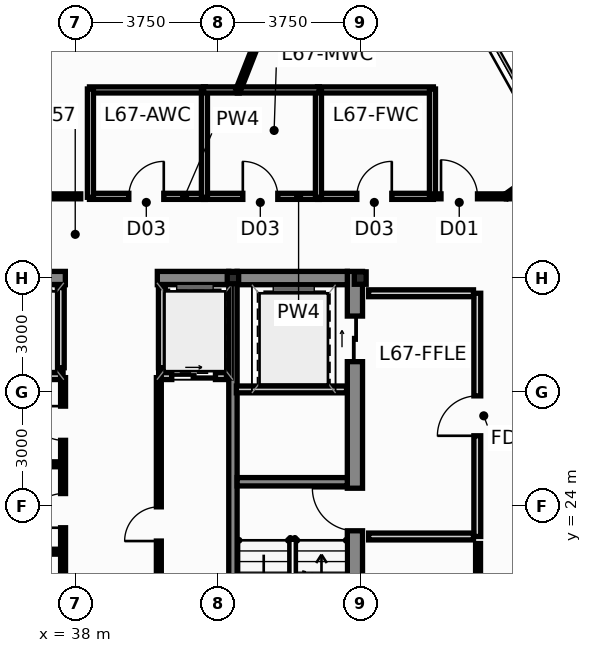
"""IFC4 building model, lengths in metres.
Left out: names, types, materials, properties, quantities, classifications, styles, units other than length and angle.
Written with IfcOpenShell. Run it as: python <this file> out.ifc"""

import sys

from ifc_helpers import new_model, si_unit, direction, frame, frame_2d, origin, origin_2d, place, context, subcontext, project, spatial, rectangle, hollow_rectangle, i_section, extrude, source, transform, mapped, element, fill, save


model = new_model("IFC4")
c1 = context("Model", 3, precision=1e-05, world=origin(), true_north=direction((0.0, 1.0)))
c2 = subcontext(c1, "Body", "Model", "MODEL_VIEW")
j1 = project(units=[si_unit("LENGTHUNIT", "METRE"), si_unit("PLANEANGLEUNIT", "RADIAN")], contexts=[c1])
p1 = place(None, origin())
s1 = spatial("IfcSite", under=j1, at=p1, CompositionType="ELEMENT")
p2 = place(p1, origin())
s2 = spatial("IfcBuilding", under=s1, at=p2, CompositionType="ELEMENT")
p3 = place(p2, frame((0.0, 0.0, 255.4)))
s3 = spatial("IfcBuildingStorey", under=s2, at=p3, CompositionType="ELEMENT", Elevation=255.4)
m1 = source(origin(), c2, "Body", "SweptSolid", [
    extrude(i_section(OverallWidth=0.311, OverallDepth=0.327, WebThickness=0.016, FlangeThickness=0.025, at=origin_2d()), origin(), (0.0, 0.0, 1.0), 3.65),
])
p4 = place(p3, frame((45.5, 30.0, 0.0), z_axis=(0.0, 0.0, 1.0), x_axis=(1.0, 0.0, 0.0)))
e1 = element("IfcColumn", 1, at=p4, inside=s3, PredefinedType="COLUMN", context=c2, shape_type="MappedRepresentation", body=[
    mapped(m1, transform((0.0, 0.0, 0.0), scale=1.0)),
])
m2 = source(origin(), c2, "Body", "SweptSolid", [
    extrude(hollow_rectangle(XDim=0.3, YDim=0.3, WallThickness=0.012, at=origin_2d()), origin(), (0.0, 0.0, 1.0), 3.65),
])
p5 = place(p3, frame((42.15, 30.0, 0.0), z_axis=(0.0, 0.0, 1.0), x_axis=(1.0, 0.0, 0.0)))
e2 = element("IfcColumn", 2, at=p5, inside=s3, PredefinedType="COLUMN", context=c2, shape_type="MappedRepresentation", body=[
    mapped(m2, transform((0.0, 0.0, 0.0), scale=1.0)),
])
p6 = place(p3, frame((45.36, 17.05, 0.0), z_axis=(0.0, 0.0, 1.0), x_axis=(0.0, 1.0, 0.0)))
e3 = element("IfcWall", 3, at=p6, inside=s3, PredefinedType="SHEAR", context=c2, shape_type="SweptSolid", body=[
    extrude(rectangle(XDim=13.125, YDim=0.4, at=frame_2d((6.562, 0.0))), origin(), (0.0, 0.0, 1.0), 3.65),
])
p7 = place(p6, frame((6.3, 0.0, 0.0)))
e4 = element("IfcOpeningElement", 4, at=p7, cuts=e3, PredefinedType="OPENING", context=c2, shape_type="SweptSolid", body=[
    extrude(rectangle(XDim=1.12, YDim=2.15, at=frame_2d((0.56, 1.075))), frame((0.0, 0.212, 0.0), z_axis=(0.0, -1.0, 0.0), x_axis=(1.0, 0.0, 0.0)), (0.0, 0.0, 1.0), 0.424),
])
p8 = place(p6, frame((10.75, 0.0, 0.0)))
e5 = element("IfcOpeningElement", 5, at=p8, cuts=e3, PredefinedType="OPENING", context=c2, shape_type="SweptSolid", body=[
    extrude(rectangle(XDim=1.2, YDim=2.2, at=frame_2d((0.6, 1.1))), frame((0.0, 0.212, 0.0), z_axis=(0.0, -1.0, 0.0), x_axis=(1.0, 0.0, 0.0)), (0.0, 0.0, 1.0), 0.424),
])
p9 = place(p3, frame((33.96, 30.0, 0.0), z_axis=(0.0, 0.0, 1.0), x_axis=(1.0, 0.0, 0.0)))
e6 = element("IfcWall", 6, at=p9, inside=s3, PredefinedType="SHEAR", context=c2, shape_type="SweptSolid", body=[
    extrude(rectangle(XDim=3.78, YDim=0.35, at=frame_2d((1.89, 0.0))), origin(), (0.0, 0.0, 1.0), 3.65),
])
p10 = place(p3, frame((40.16, 30.0, 0.0), z_axis=(0.0, 0.0, 1.0), x_axis=(1.0, 0.0, 0.0)))
e7 = element("IfcWall", 7, at=p10, inside=s3, PredefinedType="SHEAR", context=c2, shape_type="SweptSolid", body=[
    extrude(rectangle(XDim=1.88, YDim=0.35, at=frame_2d((0.94, 0.0))), origin(), (0.0, 0.0, 1.0), 3.65),
])
p11 = place(p3, frame((42.26, 30.0, 0.0), z_axis=(0.0, 0.0, 1.0), x_axis=(1.0, 0.0, 0.0)))
e8 = element("IfcWall", 8, at=p11, inside=s3, PredefinedType="SHEAR", context=c2, shape_type="SweptSolid", body=[
    extrude(rectangle(XDim=2.9, YDim=0.35, at=frame_2d((1.45, 0.0))), origin(), (0.0, 0.0, 1.0), 3.65),
])
p12 = place(p3, frame((42.15, 17.05, 0.0), z_axis=(0.0, 0.0, 1.0), x_axis=(0.0, 1.0, 0.0)))
e9 = element("IfcWall", 9, at=p12, inside=s3, PredefinedType="SHEAR", context=c2, shape_type="SweptSolid", body=[
    extrude(rectangle(XDim=13.125, YDim=0.22, at=frame_2d((6.562, 0.0))), origin(), (0.0, 0.0, 1.0), 3.65),
])
p13 = place(p3, frame((42.26, 24.64, 0.0), z_axis=(0.0, 0.0, 1.0), x_axis=(1.0, 0.0, 0.0)))
e10 = element("IfcWall", 10, at=p13, inside=s3, PredefinedType="SHEAR", context=c2, shape_type="SweptSolid", body=[
    extrude(rectangle(XDim=2.9, YDim=0.22, at=frame_2d((1.45, 0.0))), origin(), (0.0, 0.0, 1.0), 3.65),
])
p14 = place(p3, frame((34.02, 27.42, 0.0), z_axis=(0.0, 0.0, 1.0), x_axis=(1.0, 0.0, 0.0)))
e11 = element("IfcWall", 11, at=p14, inside=s3, PredefinedType="PARTITIONING", context=c2, shape_type="SweptSolid", body=[
    extrude(rectangle(XDim=3.66, YDim=0.18, at=frame_2d((1.83, 0.0))), origin(), (0.0, 0.0, 1.0), 3.4),
])
p15 = place(p14, frame((0.3, 0.0, 0.0)))
e12 = element("IfcOpeningElement", 12, at=p15, cuts=e11, PredefinedType="OPENING", context=c2, shape_type="SweptSolid", body=[
    extrude(rectangle(XDim=1.15, YDim=2.2, at=frame_2d((0.575, 1.1))), frame((0.0, 0.102, 0.0), z_axis=(0.0, -1.0, 0.0), x_axis=(1.0, 0.0, 0.0)), (0.0, 0.0, 1.0), 0.204),
])
p16 = place(p14, frame((2.1, 0.0, 0.0)))
e13 = element("IfcOpeningElement", 13, at=p16, cuts=e11, PredefinedType="OPENING", context=c2, shape_type="SweptSolid", body=[
    extrude(rectangle(XDim=1.15, YDim=2.2, at=frame_2d((0.575, 1.1))), frame((0.0, 0.102, 0.0), z_axis=(0.0, -1.0, 0.0), x_axis=(1.0, 0.0, 0.0)), (0.0, 0.0, 1.0), 0.204),
])
p17 = place(p3, frame((40.22, 27.42, 0.0), z_axis=(0.0, 0.0, 1.0), x_axis=(1.0, 0.0, 0.0)))
e14 = element("IfcWall", 14, at=p17, inside=s3, PredefinedType="PARTITIONING", context=c2, shape_type="SweptSolid", body=[
    extrude(rectangle(XDim=1.76, YDim=0.18, at=frame_2d((0.88, 0.0))), origin(), (0.0, 0.0, 1.0), 3.4),
])
p18 = place(p17, frame((0.32, 0.0, 0.0)))
e15 = element("IfcOpeningElement", 15, at=p18, cuts=e14, PredefinedType="OPENING", context=c2, shape_type="SweptSolid", body=[
    extrude(rectangle(XDim=1.15, YDim=2.2, at=frame_2d((0.575, 1.1))), frame((0.0, 0.102, 0.0), z_axis=(0.0, -1.0, 0.0), x_axis=(1.0, 0.0, 0.0)), (0.0, 0.0, 1.0), 0.204),
])
for number, where, z_axis, x_axis in (
    (16, (37.62, 27.64, 0.0), (0.0, 0.0, 1.0), (0.0, 1.0, 0.0)),
    (17, (40.28, 27.64, 0.0), (0.0, 0.0, 1.0), (0.0, 1.0, 0.0)),
):
    element("IfcWall", number, at=place(p3, frame(where, z_axis=z_axis, x_axis=x_axis)), inside=s3, PredefinedType="PARTITIONING", context=c2, shape_type="SweptSolid", body=[
        extrude(rectangle(XDim=2.11, YDim=0.18, at=frame_2d((1.055, 0.0))), origin(), (0.0, 0.0, 1.0), 3.4),
    ])
p19 = place(p3, frame((48.58, 23.2, 0.0), z_axis=(0.0, 0.0, 1.0), x_axis=(0.0, 1.0, 0.0)))
e18 = element("IfcWall", 18, at=p19, inside=s3, PredefinedType="PARTITIONING", context=c2, shape_type="SweptSolid", body=[
    extrude(rectangle(XDim=6.4, YDim=0.18, at=frame_2d((3.2, 0.0))), origin(), (0.0, 0.0, 1.0), 3.085),
])
p20 = place(p19, frame((2.65, 0.0, 0.0)))
e19 = element("IfcOpeningElement", 19, at=p20, cuts=e18, PredefinedType="OPENING", context=c2, shape_type="SweptSolid", body=[
    extrude(rectangle(XDim=1.05, YDim=2.15, at=frame_2d((0.525, 1.075))), frame((0.0, 0.102, 0.0), z_axis=(0.0, -1.0, 0.0), x_axis=(1.0, 0.0, 0.0)), (0.0, 0.0, 1.0), 0.204),
])
for number, where, z_axis, x_axis in (
    (20, (45.72, 23.2, 0.0), (0.0, 0.0, 1.0), (1.0, 0.0, 0.0)),
    (21, (45.72, 29.6, 0.0), (0.0, 0.0, 1.0), (1.0, 0.0, 0.0)),
):
    element("IfcWall", number, at=place(p3, frame(where, z_axis=z_axis, x_axis=x_axis)), inside=s3, PredefinedType="PARTITIONING", context=c2, shape_type="SweptSolid", body=[
        extrude(rectangle(XDim=2.76, YDim=0.18, at=frame_2d((1.38, 0.0))), origin(), (0.0, 0.0, 1.0), 3.4),
    ])
p21 = place(p3, frame((42.24, 27.07, 0.0), z_axis=(0.0, 0.0, 1.0), x_axis=(1.0, 0.0, 0.0)))
e22 = element("IfcWall", 22, at=p21, inside=s3, PredefinedType="PARTITIONING", context=c2, shape_type="SweptSolid", body=[
    extrude(rectangle(XDim=2.9, YDim=0.18, at=frame_2d((1.45, 0.0))), origin(), (0.0, 0.0, 1.0), 3.4),
])
for number, where, z_axis, x_axis in (
    (23, (34.02, 22.8, 0.0), (0.0, 0.0, 1.0), (1.0, 0.0, 0.0)),
    (24, (34.02, 25.1, 0.0), (0.0, 0.0, 1.0), (1.0, 0.0, 0.0)),
):
    element("IfcWall", number, at=place(p3, frame(where, z_axis=z_axis, x_axis=x_axis)), inside=s3, PredefinedType="PARTITIONING", context=c2, shape_type="SweptSolid", body=[
        extrude(rectangle(XDim=3.58, YDim=0.13, at=frame_2d((1.79, 0.0))), origin(), (0.0, 0.0, 1.0), 3.4),
    ])
p22 = place(p3, frame((37.68, 20.48, 0.0), z_axis=(0.0, 0.0, 1.0), x_axis=(0.0, 1.0, 0.0)))
e25 = element("IfcWall", 25, at=p22, inside=s3, PredefinedType="PARTITIONING", context=c2, shape_type="SweptSolid", body=[
    extrude(rectangle(XDim=6.9, YDim=0.13, at=frame_2d((3.45, 0.0))), origin(), (0.0, 0.0, 1.0), 3.4),
])
p23 = place(p22, frame((0.65, 0.0, 0.0)))
e26 = element("IfcOpeningElement", 26, at=p23, cuts=e25, PredefinedType="OPENING", context=c2, shape_type="SweptSolid", body=[
    extrude(rectangle(XDim=0.9, YDim=2.1, at=frame_2d((0.45, 1.05))), frame((0.0, 0.077, 0.0), z_axis=(0.0, -1.0, 0.0), x_axis=(1.0, 0.0, 0.0)), (0.0, 0.0, 1.0), 0.154),
])
p24 = place(p22, frame((2.95, 0.0, 0.0)))
e27 = element("IfcOpeningElement", 27, at=p24, cuts=e25, PredefinedType="OPENING", context=c2, shape_type="SweptSolid", body=[
    extrude(rectangle(XDim=0.9, YDim=2.1, at=frame_2d((0.45, 1.05))), frame((0.0, 0.077, 0.0), z_axis=(0.0, -1.0, 0.0), x_axis=(1.0, 0.0, 0.0)), (0.0, 0.0, 1.0), 0.154),
])
p25 = place(p22, frame((5.25, 0.0, 0.0)))
e28 = element("IfcOpeningElement", 28, at=p25, cuts=e25, PredefinedType="OPENING", context=c2, shape_type="SweptSolid", body=[
    extrude(rectangle(XDim=0.9, YDim=2.1, at=frame_2d((0.45, 1.05))), frame((0.0, 0.077, 0.0), z_axis=(0.0, -1.0, 0.0), x_axis=(1.0, 0.0, 0.0)), (0.0, 0.0, 1.0), 0.154),
])
p26 = place(p3, frame((40.2, 20.48, 0.0), z_axis=(0.0, 0.0, 1.0), x_axis=(0.0, 1.0, 0.0)))
e29 = element("IfcWall", 29, at=p26, inside=s3, PredefinedType="PARTITIONING", context=c2, shape_type="SweptSolid", body=[
    extrude(rectangle(XDim=6.9, YDim=0.13, at=frame_2d((3.45, 0.0))), origin(), (0.0, 0.0, 1.0), 3.4),
])
p27 = place(p26, frame((2.6, 0.0, 0.0)))
e30 = element("IfcOpeningElement", 30, at=p27, cuts=e29, PredefinedType="OPENING", context=c2, shape_type="SweptSolid", body=[
    extrude(rectangle(XDim=0.9, YDim=2.1, at=frame_2d((0.45, 1.05))), frame((0.0, 0.077, 0.0), z_axis=(0.0, -1.0, 0.0), x_axis=(1.0, 0.0, 0.0)), (0.0, 0.0, 1.0), 0.154),
])
p28 = place(p3, frame((38.375, 32.15, 0.0), z_axis=(0.0, 0.0, 1.0), x_axis=(1.0, 0.0, 0.0)))
e31 = element("IfcWall", 31, at=p28, inside=s3, PredefinedType="PLUMBINGWALL", context=c2, shape_type="SweptSolid", body=[
    extrude(rectangle(XDim=3.05, YDim=0.16, at=frame_2d((1.525, 0.0))), origin(), (0.0, 0.0, 1.0), 3.085),
])
p29 = place(p28, frame((1.035, 0.0, 0.0)))
e32 = element("IfcOpeningElement", 32, at=p29, cuts=e31, PredefinedType="OPENING", context=c2, shape_type="SweptSolid", body=[
    extrude(rectangle(XDim=0.92, YDim=2.1, at=frame_2d((0.46, 1.05))), frame((0.0, 0.092, 0.0), z_axis=(0.0, -1.0, 0.0), x_axis=(1.0, 0.0, 0.0)), (0.0, 0.0, 1.0), 0.184),
])
p30 = place(p3, frame((41.375, 32.15, 0.0), z_axis=(0.0, 0.0, 1.0), x_axis=(1.0, 0.0, 0.0)))
e33 = element("IfcWall", 33, at=p30, inside=s3, PredefinedType="PLUMBINGWALL", context=c2, shape_type="SweptSolid", body=[
    extrude(rectangle(XDim=3.05, YDim=0.16, at=frame_2d((1.525, 0.0))), origin(), (0.0, 0.0, 1.0), 3.085),
])
p31 = place(p30, frame((1.035, 0.0, 0.0)))
e34 = element("IfcOpeningElement", 34, at=p31, cuts=e33, PredefinedType="OPENING", context=c2, shape_type="SweptSolid", body=[
    extrude(rectangle(XDim=0.92, YDim=2.1, at=frame_2d((0.46, 1.05))), frame((0.0, 0.092, 0.0), z_axis=(0.0, -1.0, 0.0), x_axis=(1.0, 0.0, 0.0)), (0.0, 0.0, 1.0), 0.184),
])
p32 = place(p3, frame((44.375, 32.15, 0.0), z_axis=(0.0, 0.0, 1.0), x_axis=(1.0, 0.0, 0.0)))
e35 = element("IfcWall", 35, at=p32, inside=s3, PredefinedType="PLUMBINGWALL", context=c2, shape_type="SweptSolid", body=[
    extrude(rectangle(XDim=3.05, YDim=0.16, at=frame_2d((1.525, 0.0))), origin(), (0.0, 0.0, 1.0), 3.085),
])
p33 = place(p32, frame((1.035, 0.0, 0.0)))
e36 = element("IfcOpeningElement", 36, at=p33, cuts=e35, PredefinedType="OPENING", context=c2, shape_type="SweptSolid", body=[
    extrude(rectangle(XDim=0.92, YDim=2.1, at=frame_2d((0.46, 1.05))), frame((0.0, 0.092, 0.0), z_axis=(0.0, -1.0, 0.0), x_axis=(1.0, 0.0, 0.0)), (0.0, 0.0, 1.0), 0.184),
])
for number, where, z_axis, x_axis in (
    (37, (38.375, 34.95, 0.0), (0.0, 0.0, 1.0), (1.0, 0.0, 0.0)),
    (38, (47.425, 34.95, 0.0), (0.0, 0.0, 1.0), (-1.0, 0.0, 0.0)),
):
    element("IfcWall", number, at=place(p3, frame(where, z_axis=z_axis, x_axis=x_axis)), inside=s3, PredefinedType="PLUMBINGWALL", context=c2, shape_type="SweptSolid", body=[
        extrude(rectangle(XDim=3.05, YDim=0.16, at=frame_2d((1.525, 0.0))), origin(), (0.0, 0.0, 1.0), 3.085),
    ])
for number, where, z_axis, x_axis in (
    (39, (41.4, 32.125, 0.0), (0.0, 0.0, 1.0), (0.0, 1.0, 0.0)),
    (40, (38.4, 32.125, 0.0), (0.0, 0.0, 1.0), (0.0, 1.0, 0.0)),
):
    element("IfcWall", number, at=place(p3, frame(where, z_axis=z_axis, x_axis=x_axis)), inside=s3, PredefinedType="PLUMBINGWALL", context=c2, shape_type="SweptSolid", body=[
        extrude(rectangle(XDim=2.85, YDim=0.16, at=frame_2d((1.425, 0.0))), origin(), (0.0, 0.0, 1.0), 3.4),
    ])
for number, where, z_axis, x_axis in (
    (41, (44.4, 32.125, 0.0), (0.0, 0.0, 1.0), (0.0, 1.0, 0.0)),
    (42, (47.4, 32.125, 0.0), (0.0, 0.0, 1.0), (0.0, 1.0, 0.0)),
):
    element("IfcWall", number, at=place(p3, frame(where, z_axis=z_axis, x_axis=x_axis)), inside=s3, PredefinedType="PLUMBINGWALL", context=c2, shape_type="SweptSolid", body=[
        extrude(rectangle(XDim=2.85, YDim=0.16, at=frame_2d((1.425, 0.0))), origin(), (0.0, 0.0, 1.0), 2.985),
    ])
p34 = place(p3, frame((42.265, 34.95, 0.0), z_axis=(0.0, 0.0, 1.0), x_axis=(1.0, 0.0, 0.0)))
e43 = element("IfcWall", 43, at=p34, inside=s3, PredefinedType="PLUMBINGWALL", context=c2, shape_type="SweptSolid", body=[
    extrude(rectangle(XDim=2.16, YDim=0.16, at=frame_2d((1.08, 0.0))), origin(), (0.0, 0.0, 1.0), 3.085),
])
p35 = place(p3, frame((41.375, 34.95, 0.0), z_axis=(0.0, 0.0, 1.0), x_axis=(1.0, 0.0, 0.0)))
e44 = element("IfcWall", 44, at=p35, inside=s3, PredefinedType="PLUMBINGWALL", context=c2, shape_type="SweptSolid", body=[
    extrude(rectangle(XDim=0.94, YDim=0.16, at=frame_2d((0.47, 0.0))), origin(), (0.0, 0.0, 1.0), 3.085),
])
p36 = place(p3, frame((42.292, 34.955, 0.0), z_axis=(0.0, 0.0, 1.0), x_axis=(0.364993246942, 0.931010166264, 0.0)))
e45 = element("IfcWall", 45, at=p36, inside=s3, PredefinedType="PARTITIONING", context=c2, shape_type="SweptSolid", body=[
    extrude(rectangle(XDim=8.229, YDim=0.13, at=frame_2d((4.115, 0.0))), origin(), (0.0, 0.0, 1.0), 3.4),
])
p37 = place(p36, frame((3.635, 0.0, 0.0)))
e46 = element("IfcOpeningElement", 46, at=p37, cuts=e45, PredefinedType="OPENING", context=c2, shape_type="SweptSolid", body=[
    extrude(rectangle(XDim=0.96, YDim=2.15, at=frame_2d((0.48, 1.075))), frame((0.0, 0.077, 0.0), z_axis=(0.0, -1.0, 0.0), x_axis=(1.0, 0.0, 0.0)), (0.0, 0.0, 1.0), 0.154),
])
p38 = place(p3, frame((31.605, 32.15, 0.0), z_axis=(0.0, 0.0, 1.0), x_axis=(1.0, 0.0, 0.0)))
e47 = element("IfcWall", 47, at=p38, inside=s3, PredefinedType="PARTITIONING", context=c2, shape_type="SweptSolid", body=[
    extrude(rectangle(XDim=6.54, YDim=0.13, at=frame_2d((3.27, 0.0))), origin(), (0.0, 0.0, 1.0), 3.085),
])
p39 = place(p38, frame((2.79, 0.0, 0.0)))
e48 = element("IfcOpeningElement", 48, at=p39, cuts=e47, PredefinedType="OPENING", context=c2, shape_type="SweptSolid", body=[
    extrude(rectangle(XDim=0.96, YDim=2.15, at=frame_2d((0.48, 1.075))), frame((0.0, 0.077, 0.0), z_axis=(0.0, -1.0, 0.0), x_axis=(1.0, 0.0, 0.0)), (0.0, 0.0, 1.0), 0.154),
])
p40 = place(p3, frame((48.6, 17.105, 0.0), z_axis=(0.0, 0.0, 1.0), x_axis=(0.0, 1.0, 0.0)))
e49 = element("IfcWall", 49, at=p40, inside=s3, PredefinedType="PARTITIONING", context=c2, shape_type="SweptSolid", body=[
    extrude(rectangle(XDim=5.91, YDim=0.13, at=frame_2d((2.955, 0.0))), origin(), (0.0, 0.0, 1.0), 3.085),
])
p41 = place(p40, frame((2.475, 0.0, 0.0)))
e50 = element("IfcOpeningElement", 50, at=p41, cuts=e49, PredefinedType="OPENING", context=c2, shape_type="SweptSolid", body=[
    extrude(rectangle(XDim=0.96, YDim=2.15, at=frame_2d((0.48, 1.075))), frame((0.0, 0.077, 0.0), z_axis=(0.0, -1.0, 0.0), x_axis=(1.0, 0.0, 0.0)), (0.0, 0.0, 1.0), 0.154),
])
p42 = place(p3, frame((47.405, 32.15, 0.0), z_axis=(0.0, 0.0, 1.0), x_axis=(1.0, 0.0, 0.0)))
e51 = element("IfcWall", 51, at=p42, inside=s3, PredefinedType="PARTITIONING", context=c2, shape_type="SweptSolid", body=[
    extrude(rectangle(XDim=1.93, YDim=0.13, at=frame_2d((0.965, 0.0))), origin(), (0.0, 0.0, 1.0), 3.4),
])
p43 = place(p42, frame((0.22, 0.0, 0.0)))
e52 = element("IfcOpeningElement", 52, at=p43, cuts=e51, PredefinedType="OPENING", context=c2, shape_type="SweptSolid", body=[
    extrude(rectangle(XDim=0.96, YDim=2.15, at=frame_2d((0.48, 1.075))), frame((0.0, 0.077, 0.0), z_axis=(0.0, -1.0, 0.0), x_axis=(1.0, 0.0, 0.0)), (0.0, 0.0, 1.0), 0.154),
])
p44 = place(p3, frame((49.344, 32.153, 0.0), z_axis=(0.0, 0.0, 1.0), x_axis=(0.813409989017, 0.581690802546, 0.0)))
e53 = element("IfcWall", 53, at=p44, inside=s3, PredefinedType="PARTITIONING", context=c2, shape_type="SweptSolid", body=[
    extrude(rectangle(XDim=1.582, YDim=0.13, at=frame_2d((0.791, 0.0))), origin(), (0.0, 0.0, 1.0), 3.4),
])
p45 = place(p3, frame((51.121, 32.15, 0.0), z_axis=(0.0, 0.0, 1.0), x_axis=(-1.0, 0.0, 0.0)))
e54 = element("IfcWall", 54, at=p45, inside=s3, PredefinedType="PARTITIONING", context=c2, shape_type="SweptSolid", body=[
    extrude(rectangle(XDim=1.776, YDim=0.13, at=frame_2d((0.888, 0.0))), origin(), (0.0, 0.0, 1.0), 3.4),
])
p46 = place(p7, origin())
e55 = element("IfcDoor", 55, at=p46, inside=s3, OperationType="SINGLE_SWING_RIGHT", PredefinedType="DOOR", context=c2, shape_type="SweptSolid", body=[
    extrude(rectangle(XDim=1.12, YDim=2.15, at=frame_2d((0.56, 1.075))), frame((0.0, 0.025, 0.0), z_axis=(0.0, -1.0, 0.0), x_axis=(1.0, 0.0, 0.0)), (0.0, 0.0, 1.0), 0.05),
])
fill(e4, e55)
p47 = place(p8, origin())
e56 = element("IfcDoor", 56, at=p47, inside=s3, OperationType="SLIDING_TO_RIGHT", PredefinedType="DOOR", context=c2, shape_type="SweptSolid", body=[
    extrude(rectangle(XDim=1.2, YDim=2.2, at=frame_2d((0.6, 1.1))), frame((0.0, 0.025, 0.0), z_axis=(0.0, -1.0, 0.0), x_axis=(1.0, 0.0, 0.0)), (0.0, 0.0, 1.0), 0.05),
])
fill(e5, e56)
p48 = place(p18, origin())
e57 = element("IfcDoor", 57, at=p48, inside=s3, OperationType="SLIDING_TO_RIGHT", PredefinedType="DOOR", context=c2, shape_type="SweptSolid", body=[
    extrude(rectangle(XDim=1.15, YDim=2.2, at=frame_2d((0.575, 1.1))), frame((0.0, 0.025, 0.0), z_axis=(0.0, -1.0, 0.0), x_axis=(1.0, 0.0, 0.0)), (0.0, 0.0, 1.0), 0.05),
])
fill(e15, e57)
p49 = place(p20, origin())
e58 = element("IfcDoor", 58, at=p49, inside=s3, OperationType="SINGLE_SWING_LEFT", PredefinedType="DOOR", context=c2, shape_type="SweptSolid", body=[
    extrude(rectangle(XDim=1.05, YDim=2.15, at=frame_2d((0.525, 1.075))), frame((0.0, 0.025, 0.0), z_axis=(0.0, -1.0, 0.0), x_axis=(1.0, 0.0, 0.0)), (0.0, 0.0, 1.0), 0.05),
])
fill(e19, e58)
p50 = place(p24, origin())
e59 = element("IfcDoor", 59, at=p50, inside=s3, OperationType="SINGLE_SWING_LEFT", PredefinedType="DOOR", context=c2, shape_type="SweptSolid", body=[
    extrude(rectangle(XDim=0.9, YDim=2.1, at=frame_2d((0.45, 1.05))), frame((0.0, 0.025, 0.0), z_axis=(0.0, -1.0, 0.0), x_axis=(1.0, 0.0, 0.0)), (0.0, 0.0, 1.0), 0.05),
])
fill(e27, e59)
p51 = place(p25, origin())
e60 = element("IfcDoor", 60, at=p51, inside=s3, OperationType="SINGLE_SWING_RIGHT", PredefinedType="DOOR", context=c2, shape_type="SweptSolid", body=[
    extrude(rectangle(XDim=0.9, YDim=2.1, at=frame_2d((0.45, 1.05))), frame((0.0, 0.025, 0.0), z_axis=(0.0, -1.0, 0.0), x_axis=(1.0, 0.0, 0.0)), (0.0, 0.0, 1.0), 0.05),
])
fill(e28, e60)
p52 = place(p27, origin())
e61 = element("IfcDoor", 61, at=p52, inside=s3, OperationType="SINGLE_SWING_LEFT", PredefinedType="DOOR", context=c2, shape_type="SweptSolid", body=[
    extrude(rectangle(XDim=0.9, YDim=2.1, at=frame_2d((0.45, 1.05))), frame((0.0, 0.025, 0.0), z_axis=(0.0, -1.0, 0.0), x_axis=(1.0, 0.0, 0.0)), (0.0, 0.0, 1.0), 0.05),
])
fill(e30, e61)
p53 = place(p29, origin())
e62 = element("IfcDoor", 62, at=p53, inside=s3, OperationType="SINGLE_SWING_RIGHT", PredefinedType="DOOR", context=c2, shape_type="SweptSolid", body=[
    extrude(rectangle(XDim=0.92, YDim=2.1, at=frame_2d((0.46, 1.05))), frame((0.0, 0.025, 0.0), z_axis=(0.0, -1.0, 0.0), x_axis=(1.0, 0.0, 0.0)), (0.0, 0.0, 1.0), 0.05),
])
fill(e32, e62)
p54 = place(p31, origin())
e63 = element("IfcDoor", 63, at=p54, inside=s3, OperationType="SINGLE_SWING_LEFT", PredefinedType="DOOR", context=c2, shape_type="SweptSolid", body=[
    extrude(rectangle(XDim=0.92, YDim=2.1, at=frame_2d((0.46, 1.05))), frame((0.0, 0.025, 0.0), z_axis=(0.0, -1.0, 0.0), x_axis=(1.0, 0.0, 0.0)), (0.0, 0.0, 1.0), 0.05),
])
fill(e34, e63)
p55 = place(p33, origin())
e64 = element("IfcDoor", 64, at=p55, inside=s3, OperationType="SINGLE_SWING_RIGHT", PredefinedType="DOOR", context=c2, shape_type="SweptSolid", body=[
    extrude(rectangle(XDim=0.92, YDim=2.1, at=frame_2d((0.46, 1.05))), frame((0.0, 0.025, 0.0), z_axis=(0.0, -1.0, 0.0), x_axis=(1.0, 0.0, 0.0)), (0.0, 0.0, 1.0), 0.05),
])
fill(e36, e64)
p56 = place(p43, origin())
e65 = element("IfcDoor", 65, at=p56, inside=s3, OperationType="SINGLE_SWING_LEFT", PredefinedType="DOOR", context=c2, shape_type="SweptSolid", body=[
    extrude(rectangle(XDim=0.96, YDim=2.15, at=frame_2d((0.48, 1.075))), frame((0.0, 0.025, 0.0), z_axis=(0.0, -1.0, 0.0), x_axis=(1.0, 0.0, 0.0)), (0.0, 0.0, 1.0), 0.05),
])
fill(e52, e65)
save(model, sys.argv[1])
